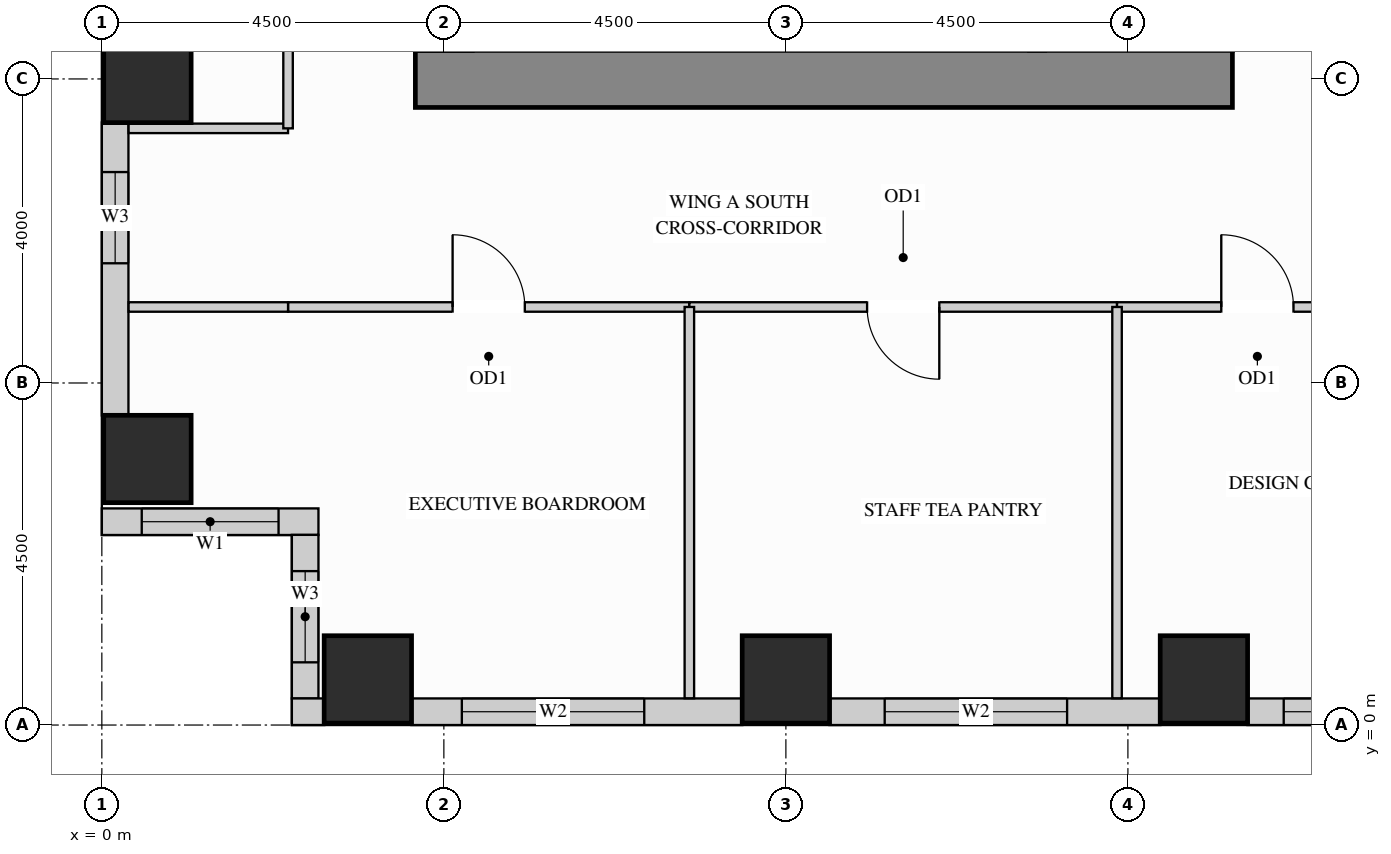
"""IFC4 building model, lengths in metres.
Left out: names, types, materials, properties, quantities, classifications, styles, units other than length and angle.
Written with IfcOpenShell. Run it as: python <this file> out.ifc"""

import sys

from ifc_helpers import new_model, si_unit, direction, frame, frame_2d, origin, origin_2d, place, context, subcontext, project, spatial, rectangle, extrude, source, transform, mapped, element, fill, save


model = new_model("IFC4")
c1 = context("Model", 3, precision=1e-05, world=origin(), true_north=direction((0.0, 1.0)))
c2 = subcontext(c1, "Body", "Model", "MODEL_VIEW")
j1 = project(units=[si_unit("LENGTHUNIT", "METRE"), si_unit("PLANEANGLEUNIT", "RADIAN")], contexts=[c1])
p1 = place(None, origin())
s1 = spatial("IfcSite", under=j1, at=p1, CompositionType="ELEMENT")
p2 = place(p1, origin())
s2 = spatial("IfcBuilding", under=s1, at=p2, CompositionType="ELEMENT")
p3 = place(p2, frame((0.0, 0.0, 81.0)))
s3 = spatial("IfcBuildingStorey", under=s2, at=p3, CompositionType="ELEMENT", Elevation=81.0)
m1 = source(origin(), c2, "Body", "SweptSolid", [
    extrude(rectangle(XDim=1.15, YDim=1.15, at=origin_2d()), origin(), (0.0, 0.0, 1.0), 3.38),
])
for number, where, z_axis, x_axis in (
    (1, (14.5, 0.6, 0.0), (0.0, 0.0, 1.0), (1.0, 0.0, 0.0)),
    (2, (3.5, 0.6, 0.0), (0.0, 0.0, 1.0), (1.0, 0.0, 0.0)),
    (3, (9.0, 0.6, 0.0), (0.0, 0.0, 1.0), (1.0, 0.0, 0.0)),
    (4, (0.6, 3.5, 0.0), (0.0, 0.0, 1.0), (1.0, 0.0, 0.0)),
    (5, (0.6, 8.5, 0.0), (0.0, 0.0, 1.0), (1.0, 0.0, 0.0)),
):
    element("IfcColumn", number, at=place(p3, frame(where, z_axis=z_axis, x_axis=x_axis)), inside=s3, PredefinedType="COLUMN", context=c2, shape_type="MappedRepresentation", body=[
        mapped(m1, transform((0.0, 0.0, 0.0), x_axis=(1.0, 0.0, 0.0), y_axis=(0.0, 1.0, 0.0), z_axis=(0.0, 0.0, 1.0))),
    ])
m2 = source(origin(), c2, "Body", "SweptSolid", [
    extrude(rectangle(XDim=10.75, YDim=0.75, at=frame_2d((5.375, 0.0))), origin(), (0.0, 0.0, 1.0), 3.38),
])
p4 = place(p3, frame((4.125, 8.5, 0.0), z_axis=(0.0, 0.0, 1.0), x_axis=(1.0, 0.0, 0.0)))
e6 = element("IfcWall", 6, at=p4, inside=s3, PredefinedType="SHEAR", context=c2, shape_type="MappedRepresentation", body=[
    mapped(m2, transform((0.0, 0.0, 0.0), x_axis=(1.0, 0.0, 0.0), y_axis=(0.0, 1.0, 0.0), z_axis=(0.0, 0.0, 1.0))),
])
p5 = place(p3, frame((0.175, 7.927, 0.0), z_axis=(0.0, 0.0, 1.0), x_axis=(0.0, -1.0, 0.0)))
e7 = element("IfcWall", 7, at=p5, inside=s3, PredefinedType="SOLIDWALL", context=c2, shape_type="SweptSolid", body=[
    extrude(rectangle(XDim=3.854, YDim=0.35, at=frame_2d((1.927, 0.0))), origin(), (0.0, 0.0, 1.0), 3.365),
])
p6 = place(p5, frame((0.652, 0.0, 0.78)))
e8 = element("IfcOpeningElement", 8, at=p6, cuts=e7, PredefinedType="OPENING", context=c2, shape_type="SweptSolid", body=[
    extrude(rectangle(XDim=1.2, YDim=2.1, at=frame_2d((0.6, 1.05))), frame((0.0, 0.185, 0.0), z_axis=(0.0, -1.0, 0.0), x_axis=(1.0, 0.0, 0.0)), (0.0, 0.0, 1.0), 0.37),
])
p7 = place(p3, frame((0.0, 2.675, 0.0), z_axis=(0.0, 0.0, 1.0), x_axis=(1.0, 0.0, 0.0)))
e9 = element("IfcWall", 9, at=p7, inside=s3, PredefinedType="SOLIDWALL", context=c2, shape_type="SweptSolid", body=[
    extrude(rectangle(XDim=2.85, YDim=0.35, at=frame_2d((1.425, 0.0))), origin(), (0.0, 0.0, 1.0), 3.365),
])
p8 = place(p7, frame((0.525, 0.0, 0.78)))
e10 = element("IfcOpeningElement", 10, at=p8, cuts=e9, PredefinedType="OPENING", context=c2, shape_type="SweptSolid", body=[
    extrude(rectangle(XDim=1.8, YDim=2.1, at=frame_2d((0.9, 1.05))), frame((0.0, 0.185, 0.0), z_axis=(0.0, -1.0, 0.0), x_axis=(1.0, 0.0, 0.0)), (0.0, 0.0, 1.0), 0.37),
])
p9 = place(p3, frame((2.675, 2.502, 0.0), z_axis=(0.0, 0.0, 1.0), x_axis=(0.0, -1.0, 0.0)))
e11 = element("IfcWall", 11, at=p9, inside=s3, PredefinedType="SOLIDWALL", context=c2, shape_type="SweptSolid", body=[
    extrude(rectangle(XDim=2.154, YDim=0.35, at=frame_2d((1.077, 0.0))), origin(), (0.0, 0.0, 1.0), 3.365),
])
p10 = place(p9, frame((0.477, 0.0, 0.78)))
e12 = element("IfcOpeningElement", 12, at=p10, cuts=e11, PredefinedType="OPENING", context=c2, shape_type="SweptSolid", body=[
    extrude(rectangle(XDim=1.2, YDim=2.1, at=frame_2d((0.6, 1.05))), frame((0.0, 0.185, 0.0), z_axis=(0.0, -1.0, 0.0), x_axis=(1.0, 0.0, 0.0)), (0.0, 0.0, 1.0), 0.37),
])
m3 = source(origin(), c2, "Body", "SweptSolid", [
    extrude(rectangle(XDim=0.427, YDim=0.35, at=frame_2d((0.213, 0.0))), origin(), (0.0, 0.0, 1.0), 3.365),
])
p11 = place(p3, frame((2.5, 0.175, 0.0), z_axis=(0.0, 0.0, 1.0), x_axis=(1.0, 0.0, 0.0)))
e13 = element("IfcWall", 13, at=p11, inside=s3, PredefinedType="SOLIDWALL", context=c2, shape_type="MappedRepresentation", body=[
    mapped(m3, transform((0.0, 0.0, 0.0), x_axis=(1.0, 0.0, 0.0), y_axis=(0.0, 1.0, 0.0), z_axis=(0.0, 0.0, 1.0))),
])
p12 = place(p3, frame((4.073, 0.175, 0.0), z_axis=(0.0, 0.0, 1.0), x_axis=(1.0, 0.0, 0.0)))
e14 = element("IfcWall", 14, at=p12, inside=s3, PredefinedType="SOLIDWALL", context=c2, shape_type="SweptSolid", body=[
    extrude(rectangle(XDim=4.354, YDim=0.35, at=frame_2d((2.177, 0.0))), origin(), (0.0, 0.0, 1.0), 3.365),
])
p13 = place(p12, frame((0.664, 0.0, 0.78)))
e15 = element("IfcOpeningElement", 15, at=p13, cuts=e14, PredefinedType="OPENING", context=c2, shape_type="SweptSolid", body=[
    extrude(rectangle(XDim=2.4, YDim=2.1, at=frame_2d((1.2, 1.05))), frame((0.0, 0.185, 0.0), z_axis=(0.0, -1.0, 0.0), x_axis=(1.0, 0.0, 0.0)), (0.0, 0.0, 1.0), 0.37),
])
p14 = place(p3, frame((9.573, 0.175, 0.0), z_axis=(0.0, 0.0, 1.0), x_axis=(1.0, 0.0, 0.0)))
e16 = element("IfcWall", 16, at=p14, inside=s3, PredefinedType="SOLIDWALL", context=c2, shape_type="SweptSolid", body=[
    extrude(rectangle(XDim=4.354, YDim=0.35, at=frame_2d((2.177, 0.0))), origin(), (0.0, 0.0, 1.0), 3.365),
])
p15 = place(p14, frame((0.727, 0.0, 0.78)))
e17 = element("IfcOpeningElement", 17, at=p15, cuts=e16, PredefinedType="OPENING", context=c2, shape_type="SweptSolid", body=[
    extrude(rectangle(XDim=2.4, YDim=2.1, at=frame_2d((1.2, 1.05))), frame((0.0, 0.185, 0.0), z_axis=(0.0, -1.0, 0.0), x_axis=(1.0, 0.0, 0.0)), (0.0, 0.0, 1.0), 0.37),
])
p16 = place(p3, frame((15.073, 0.175, 0.0), z_axis=(0.0, 0.0, 1.0), x_axis=(1.0, 0.0, 0.0)))
e18 = element("IfcWall", 18, at=p16, inside=s3, PredefinedType="SOLIDWALL", context=c2, shape_type="SweptSolid", body=[
    extrude(rectangle(XDim=3.354, YDim=0.35, at=frame_2d((1.677, 0.0))), origin(), (0.0, 0.0, 1.0), 3.365),
])
p17 = place(p16, frame((0.477, 0.0, 0.78)))
e19 = element("IfcOpeningElement", 19, at=p17, cuts=e18, PredefinedType="OPENING", context=c2, shape_type="SweptSolid", body=[
    extrude(rectangle(XDim=2.4, YDim=2.1, at=frame_2d((1.2, 1.05))), frame((0.0, 0.185, 0.0), z_axis=(0.0, -1.0, 0.0), x_axis=(1.0, 0.0, 0.0)), (0.0, 0.0, 1.0), 0.37),
])
m4 = source(origin(), c2, "Body", "SweptSolid", [
    extrude(rectangle(XDim=2.098, YDim=0.125, at=frame_2d((1.049, 0.0))), origin(), (0.0, 0.0, 1.0), 3.365),
])
p18 = place(p3, frame((0.352, 7.85, 0.0), z_axis=(0.0, 0.0, 1.0), x_axis=(1.0, 0.0, 0.0)))
e20 = element("IfcWall", 20, at=p18, inside=s3, PredefinedType="PARTITIONING", context=c2, shape_type="MappedRepresentation", body=[
    mapped(m4, transform((0.0, 0.0, 0.0), x_axis=(1.0, 0.0, 0.0), y_axis=(0.0, 1.0, 0.0), z_axis=(0.0, 0.0, 1.0))),
])
p19 = place(p3, frame((2.45, 5.5, 0.0), z_axis=(0.0, 0.0, 1.0), x_axis=(1.0, 0.0, 0.0)))
e21 = element("IfcWall", 21, at=p19, inside=s3, PredefinedType="PARTITIONING", context=c2, shape_type="SweptSolid", body=[
    extrude(rectangle(XDim=5.28, YDim=0.125, at=frame_2d((2.64, 0.0))), origin(), (0.0, 0.0, 1.0), 3.365),
])
p20 = place(p19, frame((2.165, 0.0, 0.0)))
e22 = element("IfcOpeningElement", 22, at=p20, cuts=e21, PredefinedType="OPENING", context=c2, shape_type="SweptSolid", body=[
    extrude(rectangle(XDim=0.95, YDim=2.15, at=frame_2d((0.475, 1.075))), frame((0.0, 0.073, 0.0), z_axis=(0.0, -1.0, 0.0), x_axis=(1.0, 0.0, 0.0)), (0.0, 0.0, 1.0), 0.145),
])
p21 = place(p3, frame((7.73, 5.5, 0.0), z_axis=(0.0, 0.0, 1.0), x_axis=(1.0, 0.0, 0.0)))
e23 = element("IfcWall", 23, at=p21, inside=s3, PredefinedType="PARTITIONING", context=c2, shape_type="SweptSolid", body=[
    extrude(rectangle(XDim=5.627, YDim=0.125, at=frame_2d((2.813, 0.0))), origin(), (0.0, 0.0, 1.0), 3.365),
])
p22 = place(p21, frame((2.338, 0.0, 0.0)))
e24 = element("IfcOpeningElement", 24, at=p22, cuts=e23, PredefinedType="OPENING", context=c2, shape_type="SweptSolid", body=[
    extrude(rectangle(XDim=0.95, YDim=2.15, at=frame_2d((0.475, 1.075))), frame((0.0, 0.073, 0.0), z_axis=(0.0, -1.0, 0.0), x_axis=(1.0, 0.0, 0.0)), (0.0, 0.0, 1.0), 0.145),
])
p23 = place(p3, frame((13.357, 5.5, 0.0), z_axis=(0.0, 0.0, 1.0), x_axis=(1.0, 0.0, 0.0)))
e25 = element("IfcWall", 25, at=p23, inside=s3, PredefinedType="PARTITIONING", context=c2, shape_type="SweptSolid", body=[
    extrude(rectangle(XDim=3.693, YDim=0.125, at=frame_2d((1.847, 0.0))), origin(), (0.0, 0.0, 1.0), 3.365),
])
p24 = place(p23, frame((1.372, 0.0, 0.0)))
e26 = element("IfcOpeningElement", 26, at=p24, cuts=e25, PredefinedType="OPENING", context=c2, shape_type="SweptSolid", body=[
    extrude(rectangle(XDim=0.95, YDim=2.15, at=frame_2d((0.475, 1.075))), frame((0.0, 0.073, 0.0), z_axis=(0.0, -1.0, 0.0), x_axis=(1.0, 0.0, 0.0)), (0.0, 0.0, 1.0), 0.145),
])
p25 = place(p3, frame((0.352, 5.5, 0.0), z_axis=(0.0, 0.0, 1.0), x_axis=(1.0, 0.0, 0.0)))
e27 = element("IfcWall", 27, at=p25, inside=s3, PredefinedType="PARTITIONING", context=c2, shape_type="MappedRepresentation", body=[
    mapped(m4, transform((0.0, 0.0, 0.0), x_axis=(1.0, 0.0, 0.0), y_axis=(0.0, 1.0, 0.0), z_axis=(0.0, 0.0, 1.0))),
])
m5 = source(origin(), c2, "Body", "SweptSolid", [
    extrude(rectangle(XDim=5.148, YDim=0.125, at=frame_2d((2.574, 0.0))), origin(), (0.0, 0.0, 1.0), 3.365),
])
for number, where, z_axis, x_axis in (
    (28, (7.73, 0.352, 0.0), (0.0, 0.0, 1.0), (0.0, 1.0, 0.0)),
    (29, (13.357, 0.352, 0.0), (0.0, 0.0, 1.0), (0.0, 1.0, 0.0)),
):
    element("IfcWall", number, at=place(p3, frame(where, z_axis=z_axis, x_axis=x_axis)), inside=s3, PredefinedType="PARTITIONING", context=c2, shape_type="MappedRepresentation", body=[
        mapped(m5, transform((0.0, 0.0, 0.0), x_axis=(1.0, 0.0, 0.0), y_axis=(0.0, 1.0, 0.0), z_axis=(0.0, 0.0, 1.0))),
    ])
p26 = place(p3, frame((2.45, 7.85, 0.0), z_axis=(0.0, 0.0, 1.0), x_axis=(0.0, 1.0, 0.0)))
e30 = element("IfcWall", 30, at=p26, inside=s3, PredefinedType="PARTITIONING", context=c2, shape_type="SweptSolid", body=[
    extrude(rectangle(XDim=7.25, YDim=0.125, at=frame_2d((3.625, 0.0))), origin(), (0.0, 0.0, 1.0), 3.365),
])
p27 = place(p26, frame((3.15, 0.0, 0.0)))
e31 = element("IfcOpeningElement", 31, at=p27, cuts=e30, PredefinedType="OPENING", context=c2, shape_type="SweptSolid", body=[
    extrude(rectangle(XDim=0.95, YDim=2.15, at=frame_2d((0.475, 1.075))), frame((0.0, 0.073, 0.0), z_axis=(0.0, -1.0, 0.0), x_axis=(1.0, 0.0, 0.0)), (0.0, 0.0, 1.0), 0.145),
])
m6 = source(origin(), c2, "Body", "SweptSolid", [
    extrude(rectangle(XDim=0.95, YDim=2.15, at=frame_2d((0.475, 1.075))), frame((0.0, 0.025, 0.0), z_axis=(0.0, -1.0, 0.0), x_axis=(1.0, 0.0, 0.0)), (0.0, 0.0, 1.0), 0.05),
])
p28 = place(p20, origin())
e32 = element("IfcDoor", 32, at=p28, inside=s3, OperationType="SINGLE_SWING_LEFT", PredefinedType="DOOR", context=c2, shape_type="MappedRepresentation", body=[
    mapped(m6, transform((0.0, 0.0, 0.0), x_axis=(1.0, 0.0, 0.0), y_axis=(0.0, 1.0, 0.0), z_axis=(0.0, 0.0, 1.0))),
])
fill(e22, e32)
p29 = place(p22, origin())
e33 = element("IfcDoor", 33, at=p29, inside=s3, OperationType="SINGLE_SWING_RIGHT", PredefinedType="DOOR", context=c2, shape_type="MappedRepresentation", body=[
    mapped(m6, transform((0.0, 0.0, 0.0), x_axis=(1.0, 0.0, 0.0), y_axis=(0.0, 1.0, 0.0), z_axis=(0.0, 0.0, 1.0))),
])
fill(e24, e33)
p30 = place(p24, origin())
e34 = element("IfcDoor", 34, at=p30, inside=s3, OperationType="SINGLE_SWING_LEFT", PredefinedType="DOOR", context=c2, shape_type="MappedRepresentation", body=[
    mapped(m6, transform((0.0, 0.0, 0.0), x_axis=(1.0, 0.0, 0.0), y_axis=(0.0, 1.0, 0.0), z_axis=(0.0, 0.0, 1.0))),
])
fill(e26, e34)
m7 = source(origin(), c2, "Body", "SweptSolid", [
    extrude(rectangle(XDim=1.8, YDim=2.1, at=frame_2d((0.9, 1.05))), frame((0.0, 0.03, 0.0), z_axis=(0.0, -1.0, 0.0), x_axis=(1.0, 0.0, 0.0)), (0.0, 0.0, 1.0), 0.06),
])
p31 = place(p8, origin())
e35 = element("IfcWindow", 35, at=p31, inside=s3, PartitioningType="SINGLE_PANEL", PredefinedType="WINDOW", context=c2, shape_type="MappedRepresentation", body=[
    mapped(m7, transform((0.0, 0.0, 0.0), x_axis=(1.0, 0.0, 0.0), y_axis=(0.0, 1.0, 0.0), z_axis=(0.0, 0.0, 1.0))),
])
fill(e10, e35)
m8 = source(origin(), c2, "Body", "SweptSolid", [
    extrude(rectangle(XDim=2.4, YDim=2.1, at=frame_2d((1.2, 1.05))), frame((0.0, 0.03, 0.0), z_axis=(0.0, -1.0, 0.0), x_axis=(1.0, 0.0, 0.0)), (0.0, 0.0, 1.0), 0.06),
])
p32 = place(p13, origin())
e36 = element("IfcWindow", 36, at=p32, inside=s3, PartitioningType="SINGLE_PANEL", PredefinedType="WINDOW", context=c2, shape_type="MappedRepresentation", body=[
    mapped(m8, transform((0.0, 0.0, 0.0), x_axis=(1.0, 0.0, 0.0), y_axis=(0.0, 1.0, 0.0), z_axis=(0.0, 0.0, 1.0))),
])
fill(e15, e36)
p33 = place(p15, origin())
e37 = element("IfcWindow", 37, at=p33, inside=s3, PartitioningType="SINGLE_PANEL", PredefinedType="WINDOW", context=c2, shape_type="MappedRepresentation", body=[
    mapped(m8, transform((0.0, 0.0, 0.0), x_axis=(1.0, 0.0, 0.0), y_axis=(0.0, 1.0, 0.0), z_axis=(0.0, 0.0, 1.0))),
])
fill(e17, e37)
p34 = place(p17, origin())
e38 = element("IfcWindow", 38, at=p34, inside=s3, PartitioningType="SINGLE_PANEL", PredefinedType="WINDOW", context=c2, shape_type="MappedRepresentation", body=[
    mapped(m8, transform((0.0, 0.0, 0.0), x_axis=(1.0, 0.0, 0.0), y_axis=(0.0, 1.0, 0.0), z_axis=(0.0, 0.0, 1.0))),
])
fill(e19, e38)
m9 = source(origin(), c2, "Body", "SweptSolid", [
    extrude(rectangle(XDim=1.2, YDim=2.1, at=frame_2d((0.6, 1.05))), frame((0.0, 0.03, 0.0), z_axis=(0.0, -1.0, 0.0), x_axis=(1.0, 0.0, 0.0)), (0.0, 0.0, 1.0), 0.06),
])
p35 = place(p6, origin())
e39 = element("IfcWindow", 39, at=p35, inside=s3, PartitioningType="SINGLE_PANEL", PredefinedType="WINDOW", context=c2, shape_type="MappedRepresentation", body=[
    mapped(m9, transform((0.0, 0.0, 0.0), x_axis=(1.0, 0.0, 0.0), y_axis=(0.0, 1.0, 0.0), z_axis=(0.0, 0.0, 1.0))),
])
fill(e8, e39)
p36 = place(p10, origin())
e40 = element("IfcWindow", 40, at=p36, inside=s3, PartitioningType="SINGLE_PANEL", PredefinedType="WINDOW", context=c2, shape_type="MappedRepresentation", body=[
    mapped(m9, transform((0.0, 0.0, 0.0), x_axis=(1.0, 0.0, 0.0), y_axis=(0.0, 1.0, 0.0), z_axis=(0.0, 0.0, 1.0))),
])
fill(e12, e40)
save(model, sys.argv[1])
